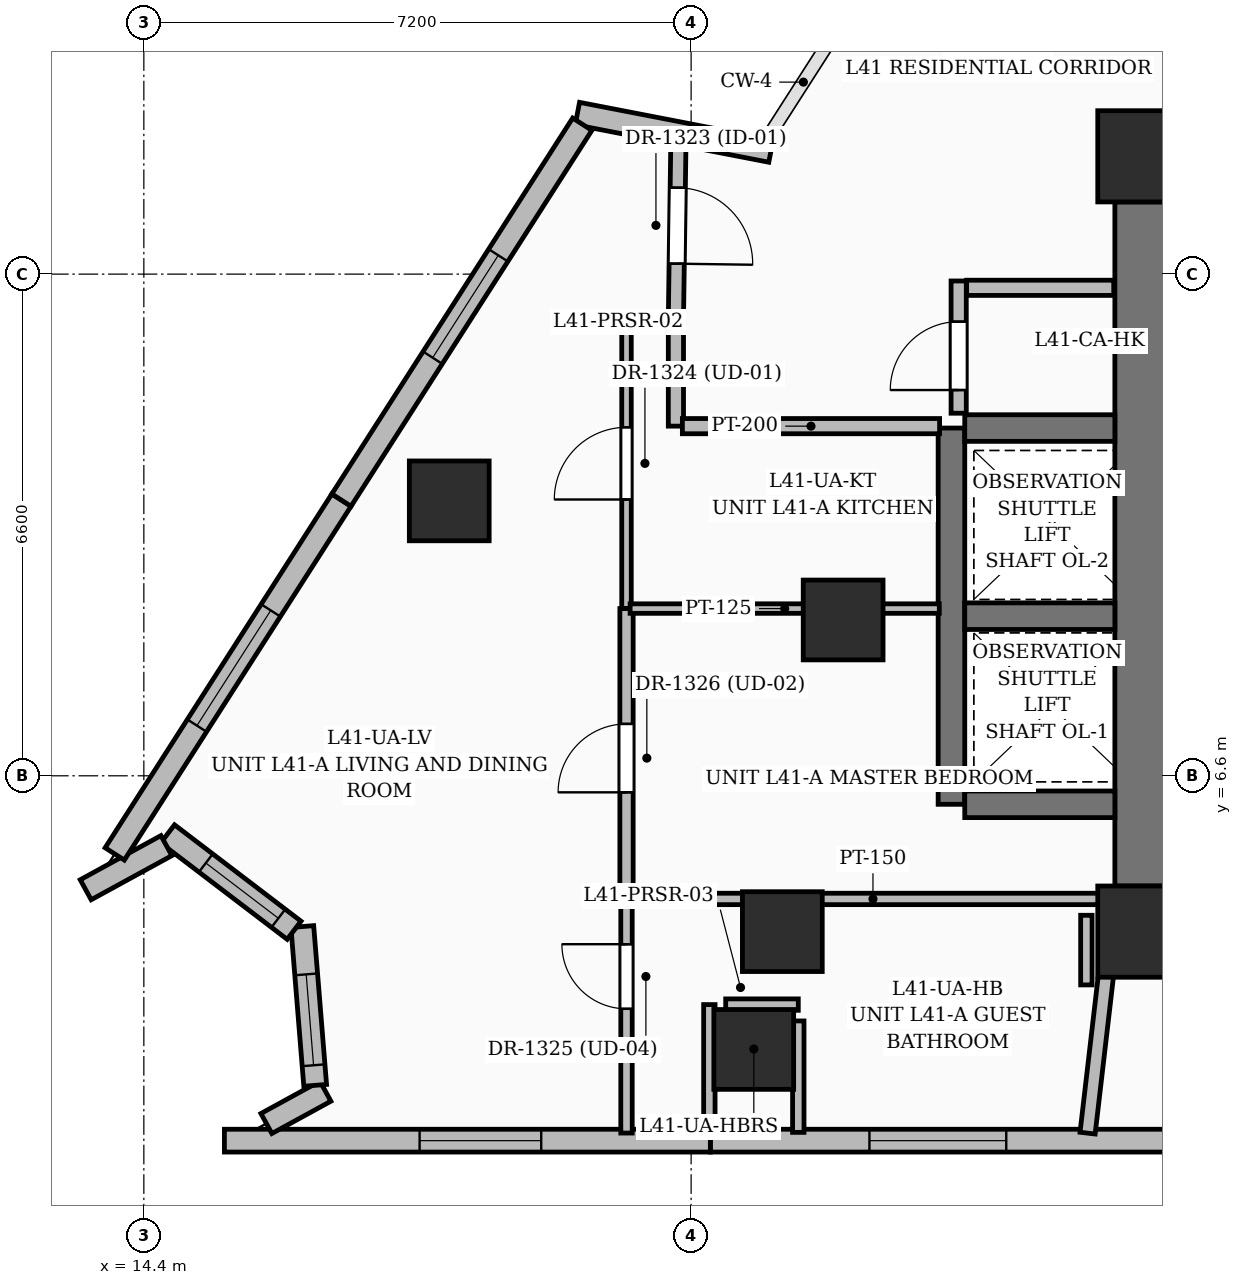
"""IFC4 building model, lengths in metres.
Left out: names, types, materials, properties, quantities, classifications, styles, units other than length and angle.
Written with IfcOpenShell. Run it as: python <this file> out.ifc"""

import sys

from ifc_helpers import new_model, si_unit, direction, frame, frame_2d, origin, origin_2d, place, context, subcontext, project, spatial, rectangle, extrude, element, fill, save


model = new_model("IFC4")
c1 = context("Model", 3, precision=1e-05, world=origin(), true_north=direction((0.0, 1.0)))
c2 = subcontext(c1, "Body", "Model", "MODEL_VIEW")
j1 = project(units=[si_unit("LENGTHUNIT", "METRE"), si_unit("PLANEANGLEUNIT", "RADIAN")], contexts=[c1])
p1 = place(None, origin())
s1 = spatial("IfcSite", under=j1, at=p1, CompositionType="ELEMENT")
p2 = place(p1, origin())
s2 = spatial("IfcBuilding", under=s1, at=p2, CompositionType="ELEMENT")
p3 = place(p2, frame((0.0, 0.0, 160.8)))
s3 = spatial("IfcBuildingStorey", under=s2, at=p3, CompositionType="ELEMENT", Elevation=160.8)
for number, where, z_axis, x_axis in (
    (1, (27.55, 4.55, 0.0), (0.0, 0.0, 1.0), (1.0, 0.0, 0.0)),
    (2, (27.55, 14.75, 0.0), (0.0, 0.0, 1.0), (1.0, 0.0, 0.0)),
):
    element("IfcColumn", number, at=place(p3, frame(where, z_axis=z_axis, x_axis=x_axis)), inside=s3, PredefinedType="COLUMN", context=c2, shape_type="SweptSolid", body=[
        extrude(rectangle(XDim=1.2, YDim=1.2, at=origin_2d()), origin(), (0.0, 0.0, 1.0), 3.6),
    ])
for number, where, z_axis, x_axis in (
    (3, (22.8, 4.55, 0.0), (0.0, 0.0, 1.0), (1.0, 0.0, 0.0)),
    (4, (23.6, 8.65, 0.0), (0.0, 0.0, 1.0), (1.0, 0.0, 0.0)),
):
    element("IfcColumn", number, at=place(p3, frame(where, z_axis=z_axis, x_axis=x_axis)), inside=s3, PredefinedType="COLUMN", context=c2, shape_type="SweptSolid", body=[
        extrude(rectangle(XDim=1.05, YDim=1.05, at=origin_2d()), origin(), (0.0, 0.0, 1.0), 3.6),
    ])
p4 = place(p3, frame((27.55, 5.15, 0.0), z_axis=(0.0, 0.0, 1.0), x_axis=(0.0, 1.0, 0.0)))
e5 = element("IfcWall", 5, at=p4, inside=s3, PredefinedType="SHEAR", context=c2, shape_type="SweptSolid", body=[
    extrude(rectangle(XDim=9.0, YDim=0.75, at=frame_2d((4.5, 0.0))), origin(), (0.0, 0.0, 1.0), 3.6),
])
p5 = place(p3, frame((25.025, 6.225, 0.0), z_axis=(0.0, 0.0, 1.0), x_axis=(0.0, 1.0, 0.0)))
e6 = element("IfcWall", 6, at=p5, inside=s3, PredefinedType="SOLIDWALL", context=c2, shape_type="SweptSolid", body=[
    extrude(rectangle(XDim=4.95, YDim=0.35, at=frame_2d((2.475, 0.0))), origin(), (0.0, 0.0, 1.0), 3.6),
])
for number, where, z_axis, x_axis in (
    (7, (25.2, 6.225, 0.0), (0.0, 0.0, 1.0), (1.0, 0.0, 0.0)),
    (8, (25.2, 8.7, 0.0), (0.0, 0.0, 1.0), (1.0, 0.0, 0.0)),
    (9, (25.2, 11.175, 0.0), (0.0, 0.0, 1.0), (1.0, 0.0, 0.0)),
):
    element("IfcWall", number, at=place(p3, frame(where, z_axis=z_axis, x_axis=x_axis)), inside=s3, PredefinedType="SOLIDWALL", context=c2, shape_type="SweptSolid", body=[
        extrude(rectangle(XDim=1.975, YDim=0.35, at=frame_2d((0.988, 0.0))), origin(), (0.0, 0.0, 1.0), 3.6),
    ])
for number, where, z_axis, x_axis in (
    (10, (22.424, 3.0, 0.0), (0.0, 0.0, 1.0), (1.0, 0.0, 0.0)),
    (11, (18.418, 10.217, 0.0), (0.0, 0.0, 1.0), (1.0, 0.0, 0.0)),
):
    element("IfcColumn", number, at=place(p3, frame(where, z_axis=z_axis, x_axis=x_axis)), inside=s3, PredefinedType="COLUMN", context=c2, shape_type="SweptSolid", body=[
        extrude(rectangle(XDim=1.05, YDim=1.05, at=origin_2d()), origin(), (0.0, 0.0, 1.0), 3.6),
    ])
p6 = place(p3, frame((20.104, 15.312, 0.0), z_axis=(0.0, 0.0, 1.0), x_axis=(0.98176398898, -0.190103839891, 0.0)))
e12 = element("IfcWall", 12, at=p6, inside=s3, PredefinedType="SOLIDWALL", context=c2, shape_type="SweptSolid", body=[
    extrude(rectangle(XDim=2.594, YDim=0.3, at=frame_2d((1.297, 0.0))), origin(), (0.0, 0.0, 1.0), 2.575),
])
p7 = place(p3, frame((28.246, 1.8, 0.0), z_axis=(0.0, 0.0, 1.0), x_axis=(-1.0, 0.0, 0.0)))
e13 = element("IfcWall", 13, at=p7, inside=s3, PredefinedType="SOLIDWALL", context=c2, shape_type="SweptSolid", body=[
    extrude(rectangle(XDim=6.393, YDim=0.3, at=frame_2d((3.197, 0.0))), origin(), (0.0, 0.0, 1.0), 3.35),
])
p8 = place(p7, frame((2.5, 0.0, 0.6)))
e14 = element("IfcOpeningElement", 14, at=p8, cuts=e13, PredefinedType="OPENING", context=c2, shape_type="SweptSolid", body=[
    extrude(rectangle(XDim=1.8, YDim=2.1, at=frame_2d((0.9, 1.05))), frame((0.0, 0.16, 0.0), z_axis=(0.0, -1.0, 0.0), x_axis=(1.0, 0.0, 0.0)), (0.0, 0.0, 1.0), 0.32),
])
p9 = place(p3, frame((21.853, 1.8, 0.0), z_axis=(0.0, 0.0, 1.0), x_axis=(-1.0, 0.0, 0.0)))
e15 = element("IfcWall", 15, at=p9, inside=s3, PredefinedType="SOLIDWALL", context=c2, shape_type="SweptSolid", body=[
    extrude(rectangle(XDim=6.393, YDim=0.3, at=frame_2d((3.197, 0.0))), origin(), (0.0, 0.0, 1.0), 3.35),
])
p10 = place(p9, frame((2.225, 0.0, 0.55)))
e16 = element("IfcOpeningElement", 16, at=p10, cuts=e15, PredefinedType="OPENING", context=c2, shape_type="SweptSolid", body=[
    extrude(rectangle(XDim=1.6, YDim=2.2, at=frame_2d((0.8, 1.1))), frame((0.0, 0.16, 0.0), z_axis=(0.0, -1.0, 0.0), x_axis=(1.0, 0.0, 0.0)), (0.0, 0.0, 1.0), 0.32),
])
p11 = place(p3, frame((16.012, 2.025, 0.0), z_axis=(0.0, 0.0, 1.0), x_axis=(0.877262241919, 0.480011415389, 0.0)))
e17 = element("IfcWall", 17, at=p11, inside=s3, PredefinedType="SOLIDWALL", context=c2, shape_type="SweptSolid", body=[
    extrude(rectangle(XDim=0.885, YDim=0.3, at=frame_2d((0.442, 0.0))), origin(), (0.0, 0.0, 1.0), 3.35),
])
p12 = place(p3, frame((16.654, 2.528, 0.0), z_axis=(0.0, 0.0, 1.0), x_axis=(-0.080962879454, 0.996717117416, 0.0)))
e18 = element("IfcWall", 18, at=p12, inside=s3, PredefinedType="SOLIDWALL", context=c2, shape_type="SweptSolid", body=[
    extrude(rectangle(XDim=2.096, YDim=0.3, at=frame_2d((1.048, 0.0))), origin(), (0.0, 0.0, 1.0), 3.35),
])
p13 = place(p12, frame((0.265, 0.0, 0.8)))
e19 = element("IfcOpeningElement", 19, at=p13, cuts=e18, PredefinedType="OPENING", context=c2, shape_type="SweptSolid", body=[
    extrude(rectangle(XDim=1.2, YDim=1.8, at=frame_2d((0.6, 0.9))), frame((0.0, 0.16, 0.0), z_axis=(0.0, -1.0, 0.0), x_axis=(1.0, 0.0, 0.0)), (0.0, 0.0, 1.0), 0.32),
])
p14 = place(p3, frame((16.377, 4.568, 0.0), z_axis=(0.0, 0.0, 1.0), x_axis=(-0.795383499791, 0.606106499107, 0.0)))
e20 = element("IfcWall", 20, at=p14, inside=s3, PredefinedType="SOLIDWALL", context=c2, shape_type="SweptSolid", body=[
    extrude(rectangle(XDim=2.092, YDim=0.3, at=frame_2d((1.046, 0.0))), origin(), (0.0, 0.0, 1.0), 3.35),
])
p15 = place(p14, frame((0.26, 0.0, 0.8)))
e21 = element("IfcOpeningElement", 21, at=p15, cuts=e20, PredefinedType="OPENING", context=c2, shape_type="SweptSolid", body=[
    extrude(rectangle(XDim=1.2, YDim=1.8, at=frame_2d((0.6, 0.9))), frame((0.0, 0.16, 0.0), z_axis=(0.0, -1.0, 0.0), x_axis=(1.0, 0.0, 0.0)), (0.0, 0.0, 1.0), 0.32),
])
p16 = place(p3, frame((14.697, 5.681, 0.0), z_axis=(0.0, 0.0, 1.0), x_axis=(-0.877355211776, -0.47984146587, 0.0)))
e22 = element("IfcWall", 22, at=p16, inside=s3, PredefinedType="SOLIDWALL", context=c2, shape_type="SweptSolid", body=[
    extrude(rectangle(XDim=1.21, YDim=0.3, at=frame_2d((0.605, 0.0))), origin(), (0.0, 0.0, 1.0), 3.35),
])
p17 = place(p3, frame((14.017, 5.572, 0.0), z_axis=(0.0, 0.0, 1.0), x_axis=(0.539464660722, 0.84200824214, 0.0)))
e23 = element("IfcWall", 23, at=p17, inside=s3, PredefinedType="SOLIDWALL", context=c2, shape_type="SweptSolid", body=[
    extrude(rectangle(XDim=5.529, YDim=0.3, at=frame_2d((2.764, 0.0))), origin(), (0.0, 0.0, 1.0), 3.35),
])
p18 = place(p17, frame((2.005, 0.0, 0.6)))
e24 = element("IfcOpeningElement", 24, at=p18, cuts=e23, PredefinedType="OPENING", context=c2, shape_type="SweptSolid", body=[
    extrude(rectangle(XDim=1.8, YDim=2.1, at=frame_2d((0.9, 1.05))), frame((0.0, 0.16, 0.0), z_axis=(0.0, -1.0, 0.0), x_axis=(1.0, 0.0, 0.0)), (0.0, 0.0, 1.0), 0.32),
])
p19 = place(p3, frame((17.0, 10.227, 0.0), z_axis=(0.0, 0.0, 1.0), x_axis=(0.539500668401, 0.841985171363, 0.0)))
e25 = element("IfcWall", 25, at=p19, inside=s3, PredefinedType="SOLIDWALL", context=c2, shape_type="SweptSolid", body=[
    extrude(rectangle(XDim=5.873, YDim=0.3, at=frame_2d((2.937, 0.0))), origin(), (0.0, 0.0, 1.0), 3.35),
])
p20 = place(p19, frame((2.225, 0.0, 0.55)))
e26 = element("IfcOpeningElement", 26, at=p20, cuts=e25, PredefinedType="OPENING", context=c2, shape_type="SweptSolid", body=[
    extrude(rectangle(XDim=1.6, YDim=2.2, at=frame_2d((0.8, 1.1))), frame((0.0, 0.16, 0.0), z_axis=(0.0, -1.0, 0.0), x_axis=(1.0, 0.0, 0.0)), (0.0, 0.0, 1.0), 0.32),
])
p21 = place(p3, frame((25.12, 11.37, 0.0), z_axis=(0.0, 0.0, 1.0), x_axis=(0.0, 1.0, 0.0)))
e27 = element("IfcWall", 27, at=p21, inside=s3, PredefinedType="PARTITIONING", context=c2, shape_type="SweptSolid", body=[
    extrude(rectangle(XDim=1.74, YDim=0.2, at=frame_2d((0.87, 0.0))), origin(), (0.0, 0.0, 1.0), 3.35),
])
p22 = place(p21, frame((0.305, 0.0, 0.0)))
e28 = element("IfcOpeningElement", 28, at=p22, cuts=e27, PredefinedType="OPENING", context=c2, shape_type="SweptSolid", body=[
    extrude(rectangle(XDim=0.9, YDim=2.1, at=frame_2d((0.45, 1.05))), frame((0.0, 0.11, 0.0), z_axis=(0.0, -1.0, 0.0), x_axis=(1.0, 0.0, 0.0)), (0.0, 0.0, 1.0), 0.22),
])
p23 = place(p3, frame((25.225, 13.02, 0.0), z_axis=(0.0, 0.0, 1.0), x_axis=(1.0, 0.0, 0.0)))
e29 = element("IfcWall", 29, at=p23, inside=s3, PredefinedType="PARTITIONING", context=c2, shape_type="SweptSolid", body=[
    extrude(rectangle(XDim=1.935, YDim=0.2, at=frame_2d((0.967, 0.0))), origin(), (0.0, 0.0, 1.0), 3.35),
])
p24 = place(p3, frame((21.433, 14.956, 0.0), z_axis=(0.0, 0.0, 1.0), x_axis=(-0.014212611143, -0.999898995741, 0.0)))
e30 = element("IfcWall", 30, at=p24, inside=s3, PredefinedType="PARTITIONING", context=c2, shape_type="SweptSolid", body=[
    extrude(rectangle(XDim=2.336, YDim=0.2, at=frame_2d((1.168, 0.0))), origin(), (0.0, 0.0, 1.0), 2.57),
])
p25 = place(p24, frame((0.619, 0.0, 0.0)))
e31 = element("IfcOpeningElement", 31, at=p25, cuts=e30, PredefinedType="OPENING", context=c2, shape_type="SweptSolid", body=[
    extrude(rectangle(XDim=1.0, YDim=2.2, at=frame_2d((0.5, 1.1))), frame((0.0, 0.11, 0.0), z_axis=(0.0, -1.0, 0.0), x_axis=(1.0, 0.0, 0.0)), (0.0, 0.0, 1.0), 0.22),
])
p26 = place(p3, frame((21.4, 12.62, 0.0), z_axis=(0.0, 0.0, 1.0), x_axis=(0.0, -1.0, 0.0)))
e32 = element("IfcWall", 32, at=p26, inside=s3, PredefinedType="PARTITIONING", context=c2, shape_type="SweptSolid", body=[
    extrude(rectangle(XDim=1.42, YDim=0.2, at=frame_2d((0.71, 0.0))), origin(), (0.0, 0.0, 1.0), 2.709),
])
p27 = place(p3, frame((21.485, 11.2, 0.0), z_axis=(0.0, 0.0, 1.0), x_axis=(1.0, 0.0, 0.0)))
e33 = element("IfcWall", 33, at=p27, inside=s3, PredefinedType="PARTITIONING", context=c2, shape_type="SweptSolid", body=[
    extrude(rectangle(XDim=3.384, YDim=0.2, at=frame_2d((1.692, 0.0))), origin(), (0.0, 0.0, 1.0), 3.35),
])
p28 = place(p3, frame((20.75, 1.9, 0.0), z_axis=(0.0, 0.0, 1.0), x_axis=(0.0, 1.0, 0.0)))
e34 = element("IfcWall", 34, at=p28, inside=s3, PredefinedType="PARTITIONING", context=c2, shape_type="SweptSolid", body=[
    extrude(rectangle(XDim=3.08, YDim=0.15, at=frame_2d((1.54, 0.0))), origin(), (0.0, 0.0, 1.0), 3.35),
])
p29 = place(p28, frame((1.635, 0.0, 0.0)))
e35 = element("IfcOpeningElement", 35, at=p29, cuts=e34, PredefinedType="OPENING", context=c2, shape_type="SweptSolid", body=[
    extrude(rectangle(XDim=0.85, YDim=2.1, at=frame_2d((0.425, 1.05))), frame((0.0, 0.085, 0.0), z_axis=(0.0, -1.0, 0.0), x_axis=(1.0, 0.0, 0.0)), (0.0, 0.0, 1.0), 0.17),
])
p30 = place(p3, frame((20.75, 8.8, 0.0), z_axis=(0.0, 0.0, 1.0), x_axis=(0.0, 1.0, 0.0)))
e36 = element("IfcWall", 36, at=p30, inside=s3, PredefinedType="PARTITIONING", context=c2, shape_type="SweptSolid", body=[
    extrude(rectangle(XDim=3.82, YDim=0.125, at=frame_2d((1.91, 0.0))), origin(), (0.0, 0.0, 1.0), 2.393),
])
p31 = place(p30, frame((1.435, 0.0, 0.0)))
e37 = element("IfcOpeningElement", 37, at=p31, cuts=e36, PredefinedType="OPENING", context=c2, shape_type="SweptSolid", body=[
    extrude(rectangle(XDim=0.95, YDim=2.2, at=frame_2d((0.475, 1.1))), frame((0.0, 0.072, 0.0), z_axis=(0.0, -1.0, 0.0), x_axis=(1.0, 0.0, 0.0)), (0.0, 0.0, 1.0), 0.145),
])
p32 = place(p3, frame((20.798, 12.62, 0.0), z_axis=(0.0, 0.0, 1.0), x_axis=(1.0, 0.0, 0.0)))
e38 = element("IfcWall", 38, at=p32, inside=s3, PredefinedType="PARTITIONING", context=c2, shape_type="SweptSolid", body=[
    extrude(rectangle(XDim=0.517, YDim=0.125, at=frame_2d((0.259, 0.0))), origin(), (0.0, 0.0, 1.0), 3.35),
])
p33 = place(p3, frame((20.75, 4.98, 0.0), z_axis=(0.0, 0.0, 1.0), x_axis=(0.0, 1.0, 0.0)))
e39 = element("IfcWall", 39, at=p33, inside=s3, PredefinedType="PARTITIONING", context=c2, shape_type="SweptSolid", body=[
    extrude(rectangle(XDim=3.82, YDim=0.175, at=frame_2d((1.91, 0.0))), origin(), (0.0, 0.0, 1.0), 2.57),
])
p34 = place(p33, frame((1.403, 0.0, 0.0)))
e40 = element("IfcOpeningElement", 40, at=p34, cuts=e39, PredefinedType="OPENING", context=c2, shape_type="SweptSolid", body=[
    extrude(rectangle(XDim=0.9, YDim=2.15, at=frame_2d((0.45, 1.075))), frame((0.0, 0.097, 0.0), z_axis=(0.0, -1.0, 0.0), x_axis=(1.0, 0.0, 0.0)), (0.0, 0.0, 1.0), 0.195),
])
p35 = place(p3, frame((27.175, 4.98, 0.0), z_axis=(0.0, 0.0, 1.0), x_axis=(-1.0, 0.0, 0.0)))
e41 = element("IfcWall", 41, at=p35, inside=s3, PredefinedType="PARTITIONING", context=c2, shape_type="SweptSolid", body=[
    extrude(rectangle(XDim=6.365, YDim=0.15, at=frame_2d((3.183, 0.0))), origin(), (0.0, 0.0, 1.0), 2.57),
])
p36 = place(p3, frame((26.816, 1.899, 0.0), z_axis=(0.0, 0.0, 1.0), x_axis=(0.115732894013, 0.993280371921, 0.0)))
e42 = element("IfcWall", 42, at=p36, inside=s3, PredefinedType="PARTITIONING", context=c2, shape_type="SweptSolid", body=[
    extrude(rectangle(XDim=3.042, YDim=0.2, at=frame_2d((1.521, 0.0))), origin(), (0.0, 0.0, 1.0), 2.57),
])
p37 = place(p3, frame((20.798, 8.8, 0.0), z_axis=(0.0, 0.0, 1.0), x_axis=(1.0, 0.0, 0.0)))
e43 = element("IfcWall", 43, at=p37, inside=s3, PredefinedType="PARTITIONING", context=c2, shape_type="SweptSolid", body=[
    extrude(rectangle(XDim=4.067, YDim=0.125, at=frame_2d((2.034, 0.0))), origin(), (0.0, 0.0, 1.0), 2.393),
])
p38 = place(p3, frame((22.2, 1.889, 0.0), z_axis=(0.0, 0.0, 1.0), x_axis=(0.0, 1.0, 0.0)))
e44 = element("IfcWall", 44, at=p38, inside=s3, PredefinedType="PARTITIONING", context=c2, shape_type="SweptSolid", body=[
    extrude(rectangle(XDim=0.02, YDim=0.15, at=frame_2d((0.01, 0.0))), origin(), (0.0, 0.0, 1.0), 3.35),
])
p39 = place(p3, frame((21.84, 1.909, 0.0), z_axis=(0.0, 0.0, 1.0), x_axis=(0.0, 1.0, 0.0)))
e45 = element("IfcWall", 45, at=p39, inside=s3, PredefinedType="PARTITIONING", context=c2, shape_type="SweptSolid", body=[
    extrude(rectangle(XDim=1.681, YDim=0.15, at=frame_2d((0.841, 0.0))), origin(), (0.0, 0.0, 1.0), 2.57),
])
p40 = place(p3, frame((22.055, 3.59, 0.0), z_axis=(0.0, 0.0, 1.0), x_axis=(1.0, 0.0, 0.0)))
e46 = element("IfcWall", 46, at=p40, inside=s3, PredefinedType="PARTITIONING", context=c2, shape_type="SweptSolid", body=[
    extrude(rectangle(XDim=0.955, YDim=0.15, at=frame_2d((0.478, 0.0))), origin(), (0.0, 0.0, 1.0), 2.57),
])
p41 = place(p3, frame((23.01, 3.375, 0.0), z_axis=(0.0, 0.0, 1.0), x_axis=(0.0, -1.0, 0.0)))
e47 = element("IfcWall", 47, at=p41, inside=s3, PredefinedType="PARTITIONING", context=c2, shape_type="SweptSolid", body=[
    extrude(rectangle(XDim=1.466, YDim=0.15, at=frame_2d((0.733, 0.0))), origin(), (0.0, 0.0, 1.0), 2.57),
])
p42 = place(p3, frame((22.64, 1.909, 0.0), z_axis=(0.0, 0.0, 1.0), x_axis=(0.0, -1.0, 0.0)))
e48 = element("IfcWall", 48, at=p42, inside=s3, PredefinedType="PARTITIONING", context=c2, shape_type="SweptSolid", body=[
    extrude(rectangle(XDim=0.02, YDim=0.15, at=frame_2d((0.01, 0.0))), origin(), (0.0, 0.0, 1.0), 3.35),
])
p43 = place(p3, frame((26.8, 3.849, 0.0), z_axis=(0.0, 0.0, 1.0), x_axis=(0.0, 1.0, 0.0)))
e49 = element("IfcWall", 49, at=p43, inside=s3, PredefinedType="PARTITIONING", context=c2, shape_type="SweptSolid", body=[
    extrude(rectangle(XDim=0.916, YDim=0.15, at=frame_2d((0.458, 0.0))), origin(), (0.0, 0.0, 1.0), 2.436),
])
p44 = place(p8, origin())
e50 = element("IfcWindow", 50, at=p44, inside=s3, PartitioningType="SINGLE_PANEL", PredefinedType="WINDOW", context=c2, shape_type="SweptSolid", body=[
    extrude(rectangle(XDim=1.8, YDim=2.1, at=frame_2d((0.9, 1.05))), frame((0.0, 0.03, 0.0), z_axis=(0.0, -1.0, 0.0), x_axis=(1.0, 0.0, 0.0)), (0.0, 0.0, 1.0), 0.06),
])
fill(e14, e50)
p45 = place(p10, origin())
e51 = element("IfcWindow", 51, at=p45, inside=s3, PartitioningType="SINGLE_PANEL", PredefinedType="WINDOW", context=c2, shape_type="SweptSolid", body=[
    extrude(rectangle(XDim=1.6, YDim=2.2, at=frame_2d((0.8, 1.1))), frame((0.0, 0.03, 0.0), z_axis=(0.0, -1.0, 0.0), x_axis=(1.0, 0.0, 0.0)), (0.0, 0.0, 1.0), 0.06),
])
fill(e16, e51)
p46 = place(p13, origin())
e52 = element("IfcWindow", 52, at=p46, inside=s3, PartitioningType="SINGLE_PANEL", PredefinedType="WINDOW", context=c2, shape_type="SweptSolid", body=[
    extrude(rectangle(XDim=1.2, YDim=1.8, at=frame_2d((0.6, 0.9))), frame((0.0, 0.03, 0.0), z_axis=(0.0, -1.0, 0.0), x_axis=(1.0, 0.0, 0.0)), (0.0, 0.0, 1.0), 0.06),
])
fill(e19, e52)
p47 = place(p15, origin())
e53 = element("IfcWindow", 53, at=p47, inside=s3, PartitioningType="SINGLE_PANEL", PredefinedType="WINDOW", context=c2, shape_type="SweptSolid", body=[
    extrude(rectangle(XDim=1.2, YDim=1.8, at=frame_2d((0.6, 0.9))), frame((0.0, 0.03, 0.0), z_axis=(0.0, -1.0, 0.0), x_axis=(1.0, 0.0, 0.0)), (0.0, 0.0, 1.0), 0.06),
])
fill(e21, e53)
p48 = place(p18, origin())
e54 = element("IfcWindow", 54, at=p48, inside=s3, PartitioningType="SINGLE_PANEL", PredefinedType="WINDOW", context=c2, shape_type="SweptSolid", body=[
    extrude(rectangle(XDim=1.8, YDim=2.1, at=frame_2d((0.9, 1.05))), frame((0.0, 0.03, 0.0), z_axis=(0.0, -1.0, 0.0), x_axis=(1.0, 0.0, 0.0)), (0.0, 0.0, 1.0), 0.06),
])
fill(e24, e54)
p49 = place(p20, origin())
e55 = element("IfcWindow", 55, at=p49, inside=s3, PartitioningType="SINGLE_PANEL", PredefinedType="WINDOW", context=c2, shape_type="SweptSolid", body=[
    extrude(rectangle(XDim=1.6, YDim=2.2, at=frame_2d((0.8, 1.1))), frame((0.0, 0.03, 0.0), z_axis=(0.0, -1.0, 0.0), x_axis=(1.0, 0.0, 0.0)), (0.0, 0.0, 1.0), 0.06),
])
fill(e26, e55)
p50 = place(p22, origin())
e56 = element("IfcDoor", 56, at=p50, inside=s3, OperationType="SINGLE_SWING_LEFT", PredefinedType="DOOR", context=c2, shape_type="SweptSolid", body=[
    extrude(rectangle(XDim=0.9, YDim=2.1, at=frame_2d((0.45, 1.05))), frame((0.0, 0.025, 0.0), z_axis=(0.0, -1.0, 0.0), x_axis=(1.0, 0.0, 0.0)), (0.0, 0.0, 1.0), 0.05),
])
fill(e28, e56)
p51 = place(p25, origin())
e57 = element("IfcDoor", 57, at=p51, inside=s3, OperationType="SINGLE_SWING_RIGHT", PredefinedType="DOOR", context=c2, shape_type="SweptSolid", body=[
    extrude(rectangle(XDim=1.0, YDim=2.2, at=frame_2d((0.5, 1.1))), frame((0.0, 0.025, 0.0), z_axis=(0.0, -1.0, 0.0), x_axis=(1.0, 0.0, 0.0)), (0.0, 0.0, 1.0), 0.05),
])
fill(e31, e57)
p52 = place(p31, origin())
e58 = element("IfcDoor", 58, at=p52, inside=s3, OperationType="SINGLE_SWING_LEFT", PredefinedType="DOOR", context=c2, shape_type="SweptSolid", body=[
    extrude(rectangle(XDim=0.95, YDim=2.2, at=frame_2d((0.475, 1.1))), frame((0.0, 0.025, 0.0), z_axis=(0.0, -1.0, 0.0), x_axis=(1.0, 0.0, 0.0)), (0.0, 0.0, 1.0), 0.05),
])
fill(e37, e58)
p53 = place(p29, origin())
e59 = element("IfcDoor", 59, at=p53, inside=s3, OperationType="SINGLE_SWING_RIGHT", PredefinedType="DOOR", context=c2, shape_type="SweptSolid", body=[
    extrude(rectangle(XDim=0.85, YDim=2.1, at=frame_2d((0.425, 1.05))), frame((0.0, 0.025, 0.0), z_axis=(0.0, -1.0, 0.0), x_axis=(1.0, 0.0, 0.0)), (0.0, 0.0, 1.0), 0.05),
])
fill(e35, e59)
p54 = place(p34, origin())
e60 = element("IfcDoor", 60, at=p54, inside=s3, OperationType="SINGLE_SWING_LEFT", PredefinedType="DOOR", context=c2, shape_type="SweptSolid", body=[
    extrude(rectangle(XDim=0.9, YDim=2.15, at=frame_2d((0.45, 1.075))), frame((0.0, 0.025, 0.0), z_axis=(0.0, -1.0, 0.0), x_axis=(1.0, 0.0, 0.0)), (0.0, 0.0, 1.0), 0.05),
])
fill(e40, e60)
save(model, sys.argv[1])
